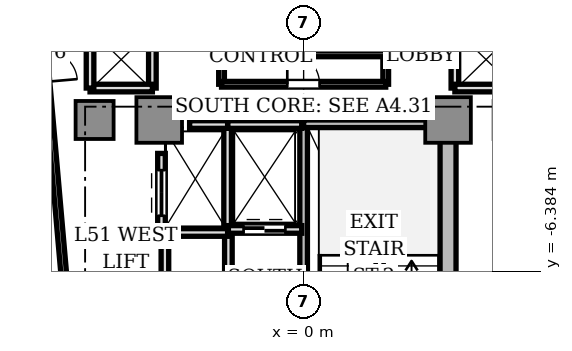
"""IFC4 building model, lengths in metres.
Left out: names, types, materials, properties, quantities, classifications, styles, units other than length and angle.
Written with IfcOpenShell. Run it as: python <this file> out.ifc"""

import sys

from ifc_helpers import new_model, si_unit, direction, frame, frame_2d, origin, origin_2d, place, context, subcontext, project, spatial, rectangle, extrude, source, transform, mapped, element, fill, save


model = new_model("IFC4")
c1 = context("Model", 3, precision=1e-05, world=origin(), true_north=direction((0.0, 1.0)))
c2 = subcontext(c1, "Body", "Model", "MODEL_VIEW")
j1 = project(units=[si_unit("LENGTHUNIT", "METRE"), si_unit("PLANEANGLEUNIT", "RADIAN")], contexts=[c1])
p1 = place(None, origin())
s1 = spatial("IfcSite", under=j1, at=p1, CompositionType="ELEMENT")
p2 = place(p1, origin())
s2 = spatial("IfcBuilding", under=s1, at=p2, CompositionType="ELEMENT")
p3 = place(p2, frame((0.0, 0.0, 185.25)))
s3 = spatial("IfcBuildingStorey", under=s2, at=p3, CompositionType="ELEMENT", Elevation=185.25)
p4 = place(p3, frame((3.8, -9.75, 0.0), z_axis=(0.0, 0.0, 1.0), x_axis=(0.0, 1.0, 0.0)))
e1 = element("IfcWall", 1, at=p4, inside=s3, PredefinedType="SHEAR", context=c2, shape_type="SweptSolid", body=[
    extrude(rectangle(XDim=6.9, YDim=0.42, at=frame_2d((3.45, 0.0))), origin(), (0.0, 0.0, 1.0), 3.11),
])
m1 = source(origin(), c2, "Body", "SweptSolid", [
    extrude(rectangle(XDim=1.2, YDim=1.2, at=origin_2d()), origin(), (0.0, 0.0, 1.0), 3.11),
])
for number, where, z_axis, x_axis in (
    (2, (-3.8, -2.4, 0.0), (0.0, 0.0, 1.0), (1.0, 0.0, 0.0)),
    (3, (3.8, -2.4, 0.0), (0.0, 0.0, 1.0), (1.0, 0.0, 0.0)),
):
    element("IfcColumn", number, at=place(p3, frame(where, z_axis=z_axis, x_axis=x_axis)), inside=s3, PredefinedType="COLUMN", context=c2, shape_type="MappedRepresentation", body=[
        mapped(m1, transform((0.0, 0.0, 0.0), scale=1.0)),
    ])
m2 = source(origin(), c2, "Body", "SweptSolid", [
    extrude(rectangle(XDim=1.0, YDim=1.0, at=origin_2d()), origin(), (0.0, 0.0, 1.0), 3.11),
])
p5 = place(p3, frame((-5.5, -2.4, 0.0), z_axis=(0.0, 0.0, 1.0), x_axis=(1.0, 0.0, 0.0)))
e4 = element("IfcColumn", 4, at=p5, inside=s3, PredefinedType="COLUMN", context=c2, shape_type="MappedRepresentation", body=[
    mapped(m2, transform((0.0, 0.0, 0.0), scale=1.0)),
])
p6 = place(p3, frame((0.0, -10.18, 0.0), z_axis=(0.0, 0.0, 1.0), x_axis=(0.0, 1.0, 0.0)))
e5 = element("IfcWall", 5, at=p6, inside=s3, PredefinedType="SOLIDWALL", context=c2, shape_type="SweptSolid", body=[
    extrude(rectangle(XDim=7.68, YDim=0.2, at=frame_2d((3.84, 0.0))), origin(), (0.0, 0.0, 1.0), 3.11),
])
p7 = place(p6, frame((0.28, 0.0, 0.0)))
e6 = element("IfcOpeningElement", 6, at=p7, cuts=e5, PredefinedType="OPENING", context=c2, shape_type="SweptSolid", body=[
    extrude(rectangle(XDim=1.1, YDim=2.15, at=frame_2d((0.55, 1.075))), frame((0.0, 0.11, 0.0), z_axis=(0.0, -1.0, 0.0), x_axis=(1.0, 0.0, 0.0)), (0.0, 0.0, 1.0), 0.22),
])
p8 = place(p3, frame((0.0, -2.5, 0.0), z_axis=(0.0, 0.0, 1.0), x_axis=(1.0, 0.0, 0.0)))
e7 = element("IfcWall", 7, at=p8, inside=s3, PredefinedType="SOLIDWALL", context=c2, shape_type="SweptSolid", body=[
    extrude(rectangle(XDim=3.72, YDim=0.2, at=frame_2d((1.86, 0.0))), origin(), (0.0, 0.0, 1.0), 3.11),
])
p9 = place(p3, frame((-1.98, -9.98, 0.0), z_axis=(0.0, 0.0, 1.0), x_axis=(0.0, 1.0, 0.0)))
e8 = element("IfcWall", 8, at=p9, inside=s3, PredefinedType="SOLIDWALL", context=c2, shape_type="SweptSolid", body=[
    extrude(rectangle(XDim=4.66, YDim=0.2, at=frame_2d((2.33, 0.0))), origin(), (0.0, 0.0, 1.0), 2.66),
])
p10 = place(p9, frame((0.2, 0.0, 0.0)))
e9 = element("IfcOpeningElement", 9, at=p10, cuts=e8, PredefinedType="OPENING", context=c2, shape_type="SweptSolid", body=[
    extrude(rectangle(XDim=0.85, YDim=2.1, at=frame_2d((0.425, 1.05))), frame((0.0, 0.11, 0.0), z_axis=(0.0, -1.0, 0.0), x_axis=(1.0, 0.0, 0.0)), (0.0, 0.0, 1.0), 0.22),
])
p11 = place(p3, frame((-2.0, -5.28, 0.0), z_axis=(0.0, 0.0, 1.0), x_axis=(0.0, 1.0, 0.0)))
e10 = element("IfcWall", 10, at=p11, inside=s3, PredefinedType="SOLIDWALL", context=c2, shape_type="SweptSolid", body=[
    extrude(rectangle(XDim=2.78, YDim=0.2, at=frame_2d((1.39, 0.0))), origin(), (0.0, 0.0, 1.0), 2.66),
])
p12 = place(p3, frame((-2.0, -2.52, 0.0), z_axis=(0.0, 0.0, 1.0), x_axis=(1.0, 0.0, 0.0)))
e11 = element("IfcWall", 11, at=p12, inside=s3, PredefinedType="SOLIDWALL", context=c2, shape_type="SweptSolid", body=[
    extrude(rectangle(XDim=1.95, YDim=0.2, at=frame_2d((0.975, 0.0))), origin(), (0.0, 0.0, 1.0), 2.66),
])
p13 = place(p3, frame((-1.98, -5.28, 0.0), z_axis=(0.0, 0.0, 1.0), x_axis=(1.0, 0.0, 0.0)))
e12 = element("IfcWall", 12, at=p13, inside=s3, PredefinedType="SOLIDWALL", context=c2, shape_type="SweptSolid", body=[
    extrude(rectangle(XDim=1.93, YDim=0.2, at=frame_2d((0.965, 0.0))), origin(), (0.0, 0.0, 1.0), 2.66),
])
p14 = place(p13, frame((0.4, 0.0, 0.0)))
e13 = element("IfcOpeningElement", 13, at=p14, cuts=e12, PredefinedType="OPENING", context=c2, shape_type="SweptSolid", body=[
    extrude(rectangle(XDim=1.1, YDim=2.2, at=frame_2d((0.55, 1.1))), frame((0.0, 0.11, 0.0), z_axis=(0.0, -1.0, 0.0), x_axis=(1.0, 0.0, 0.0)), (0.0, 0.0, 1.0), 0.22),
])
p15 = place(p3, frame((-3.0, -2.52, 0.0), z_axis=(0.0, 0.0, 1.0), x_axis=(1.0, 0.0, 0.0)))
e14 = element("IfcWall", 14, at=p15, inside=s3, PredefinedType="SOLIDWALL", context=c2, shape_type="SweptSolid", body=[
    extrude(rectangle(XDim=1.0, YDim=0.2, at=frame_2d((0.5, 0.0))), origin(), (0.0, 0.0, 1.0), 2.66),
])
p16 = place(p3, frame((-3.74, -5.36, 0.0), z_axis=(0.0, 0.0, 1.0), x_axis=(1.0, 0.0, 0.0)))
e15 = element("IfcWall", 15, at=p16, inside=s3, PredefinedType="SOLIDWALL", context=c2, shape_type="SweptSolid", body=[
    extrude(rectangle(XDim=1.74, YDim=0.2, at=frame_2d((0.87, 0.0))), origin(), (0.0, 0.0, 1.0), 2.66),
])
p17 = place(p3, frame((-3.74, -5.36, 0.0), z_axis=(0.0, 0.0, 1.0), x_axis=(0.0, 1.0, 0.0)))
e16 = element("IfcWall", 16, at=p17, inside=s3, PredefinedType="SOLIDWALL", context=c2, shape_type="SweptSolid", body=[
    extrude(rectangle(XDim=2.08, YDim=0.2, at=frame_2d((1.04, 0.0))), origin(), (0.0, 0.0, 1.0), 2.66),
])
p18 = place(p17, frame((0.44, 0.0, 0.0)))
e17 = element("IfcOpeningElement", 17, at=p18, cuts=e16, PredefinedType="OPENING", context=c2, shape_type="SweptSolid", body=[
    extrude(rectangle(XDim=1.2, YDim=2.2, at=frame_2d((0.6, 1.1))), frame((0.0, 0.11, 0.0), z_axis=(0.0, -1.0, 0.0), x_axis=(1.0, 0.0, 0.0)), (0.0, 0.0, 1.0), 0.22),
])
p19 = place(p3, frame((3.98, -1.56, 0.0), z_axis=(0.0, 0.0, 1.0), x_axis=(0.0, 1.0, 0.0)))
e18 = element("IfcWall", 18, at=p19, inside=s3, PredefinedType="SOLIDWALL", context=c2, shape_type="SweptSolid", body=[
    extrude(rectangle(XDim=3.12, YDim=0.2, at=frame_2d((1.56, 0.0))), origin(), (0.0, 0.0, 1.0), 2.28),
])
p20 = place(p3, frame((3.98, -1.56, 0.0), z_axis=(0.0, 0.0, 1.0), x_axis=(1.0, 0.0, 0.0)))
e19 = element("IfcWall", 19, at=p20, inside=s3, PredefinedType="SOLIDWALL", context=c2, shape_type="SweptSolid", body=[
    extrude(rectangle(XDim=1.64, YDim=0.2, at=frame_2d((0.82, 0.0))), origin(), (0.0, 0.0, 1.0), 2.66),
])
p21 = place(p3, frame((-3.98, -1.56, 0.0), z_axis=(0.0, 0.0, 1.0), x_axis=(0.0, 1.0, 0.0)))
e20 = element("IfcWall", 20, at=p21, inside=s3, PredefinedType="SOLIDWALL", context=c2, shape_type="SweptSolid", body=[
    extrude(rectangle(XDim=3.12, YDim=0.2, at=frame_2d((1.56, 0.0))), origin(), (0.0, 0.0, 1.0), 2.28),
])
p22 = place(p3, frame((-5.62, -1.56, 0.0), z_axis=(0.0, 0.0, 1.0), x_axis=(1.0, 0.0, 0.0)))
e21 = element("IfcWall", 21, at=p22, inside=s3, PredefinedType="SOLIDWALL", context=c2, shape_type="SweptSolid", body=[
    extrude(rectangle(XDim=1.64, YDim=0.2, at=frame_2d((0.82, 0.0))), origin(), (0.0, 0.0, 1.0), 2.66),
])
p23 = place(p3, frame((-5.62, -1.56, 0.0), z_axis=(0.0, 0.0, 1.0), x_axis=(0.0, 1.0, 0.0)))
e22 = element("IfcWall", 22, at=p23, inside=s3, PredefinedType="SOLIDWALL", context=c2, shape_type="SweptSolid", body=[
    extrude(rectangle(XDim=1.56, YDim=0.2, at=frame_2d((0.78, 0.0))), origin(), (0.0, 0.0, 1.0), 2.66),
])
p24 = place(p3, frame((-3.65, -8.81, 0.0), z_axis=(0.0, 0.0, 1.0), x_axis=(0.0, 1.0, 0.0)))
e23 = element("IfcWall", 23, at=p24, inside=s3, PredefinedType="SOLIDWALL", context=c2, shape_type="SweptSolid", body=[
    extrude(rectangle(XDim=3.43, YDim=0.2, at=frame_2d((1.715, 0.0))), origin(), (0.0, 0.0, 1.0), 2.66),
])
p25 = place(p24, frame((1.2, 0.0, 0.0)))
e24 = element("IfcOpeningElement", 24, at=p25, cuts=e23, PredefinedType="OPENING", context=c2, shape_type="SweptSolid", body=[
    extrude(rectangle(XDim=0.95, YDim=2.15, at=frame_2d((0.475, 1.075))), frame((0.0, 0.11, 0.0), z_axis=(0.0, -1.0, 0.0), x_axis=(1.0, 0.0, 0.0)), (0.0, 0.0, 1.0), 0.22),
])
p26 = place(p3, frame((2.16, -1.46, 0.0), z_axis=(0.0, 0.0, 1.0), x_axis=(0.0, 1.0, 0.0)))
e25 = element("IfcWall", 25, at=p26, inside=s3, PredefinedType="PARTITIONING", context=c2, shape_type="SweptSolid", body=[
    extrude(rectangle(XDim=2.92, YDim=0.15, at=frame_2d((1.46, 0.0))), origin(), (0.0, 0.0, 1.0), 2.66),
])
p27 = place(p26, frame((1.035, 0.0, 0.0)))
e26 = element("IfcOpeningElement", 26, at=p27, cuts=e25, PredefinedType="OPENING", context=c2, shape_type="SweptSolid", body=[
    extrude(rectangle(XDim=0.85, YDim=2.1, at=frame_2d((0.425, 1.05))), frame((0.0, 0.085, 0.0), z_axis=(0.0, -1.0, 0.0), x_axis=(1.0, 0.0, 0.0)), (0.0, 0.0, 1.0), 0.17),
])
p28 = place(p3, frame((-2.16, -1.46, 0.0), z_axis=(0.0, 0.0, 1.0), x_axis=(0.0, 1.0, 0.0)))
e27 = element("IfcWall", 27, at=p28, inside=s3, PredefinedType="PARTITIONING", context=c2, shape_type="SweptSolid", body=[
    extrude(rectangle(XDim=2.92, YDim=0.15, at=frame_2d((1.46, 0.0))), origin(), (0.0, 0.0, 1.0), 2.66),
])
p29 = place(p3, frame((-2.16, -1.46, 0.0), z_axis=(0.0, 0.0, 1.0), x_axis=(1.0, 0.0, 0.0)))
e28 = element("IfcWall", 28, at=p29, inside=s3, PredefinedType="PARTITIONING", context=c2, shape_type="SweptSolid", body=[
    extrude(rectangle(XDim=4.32, YDim=0.15, at=frame_2d((2.16, 0.0))), origin(), (0.0, 0.0, 1.0), 2.66),
])
p30 = place(p29, frame((1.73, 0.0, 0.0)))
e29 = element("IfcOpeningElement", 29, at=p30, cuts=e28, PredefinedType="OPENING", context=c2, shape_type="SweptSolid", body=[
    extrude(rectangle(XDim=0.85, YDim=2.1, at=frame_2d((0.425, 1.05))), frame((0.0, 0.085, 0.0), z_axis=(0.0, -1.0, 0.0), x_axis=(1.0, 0.0, 0.0)), (0.0, 0.0, 1.0), 0.17),
])
p31 = place(p3, frame((-2.16, -0.66, 0.0), z_axis=(0.0, 0.0, 1.0), x_axis=(1.0, 0.0, 0.0)))
e30 = element("IfcWall", 30, at=p31, inside=s3, PredefinedType="PARTITIONING", context=c2, shape_type="SweptSolid", body=[
    extrude(rectangle(XDim=4.32, YDim=0.15, at=frame_2d((2.16, 0.0))), origin(), (0.0, 0.0, 1.0), 2.66),
])
p32 = place(p3, frame((-7.373, 5.679, 0.0), z_axis=(0.0, 0.0, 1.0), x_axis=(0.087154691724, -0.996194790044, 0.0)))
e31 = element("IfcWall", 31, at=p32, inside=s3, PredefinedType="PARTITIONING", context=c2, shape_type="SweptSolid", body=[
    extrude(rectangle(XDim=12.6, YDim=0.15, at=frame_2d((6.3, 0.0))), origin(), (0.0, 0.0, 1.0), 2.66),
])
p33 = place(p32, frame((5.5, 0.0, 0.0)))
e32 = element("IfcOpeningElement", 32, at=p33, cuts=e31, PredefinedType="OPENING", context=c2, shape_type="SweptSolid", body=[
    extrude(rectangle(XDim=1.6, YDim=2.25, at=frame_2d((0.8, 1.125))), frame((0.0, 0.085, 0.0), z_axis=(0.0, -1.0, 0.0), x_axis=(1.0, 0.0, 0.0)), (0.0, 0.0, 1.0), 0.17),
])
m3 = source(origin(), c2, "Body", "SweptSolid", [
    extrude(rectangle(XDim=1.1, YDim=0.05, at=origin_2d()), origin(), (0.0, 0.0, 1.0), 2.2),
])
p34 = place(p14, frame((0.55, 0.0, 0.0)))
e33 = element("IfcDoor", 33, at=p34, inside=s3, OperationType="DOUBLE_DOOR_SLIDING", PredefinedType="DOOR", context=c2, shape_type="MappedRepresentation", body=[
    mapped(m3, transform((0.0, 0.0, 0.0), scale=1.0)),
])
fill(e13, e33)
m4 = source(origin(), c2, "Body", "SweptSolid", [
    extrude(rectangle(XDim=1.2, YDim=0.05, at=origin_2d()), origin(), (0.0, 0.0, 1.0), 2.2),
])
p35 = place(p18, frame((0.6, 0.0, 0.0)))
e34 = element("IfcDoor", 34, at=p35, inside=s3, OperationType="DOUBLE_DOOR_SLIDING", PredefinedType="DOOR", context=c2, shape_type="MappedRepresentation", body=[
    mapped(m4, transform((0.0, 0.0, 0.0), scale=1.0)),
])
fill(e17, e34)
m5 = source(origin(), c2, "Body", "SweptSolid", [
    extrude(rectangle(XDim=0.85, YDim=0.05, at=origin_2d()), origin(), (0.0, 0.0, 1.0), 2.1),
])
p36 = place(p30, frame((0.425, 0.0, 0.0)))
e35 = element("IfcDoor", 35, at=p36, inside=s3, OperationType="SINGLE_SWING_LEFT", PredefinedType="DOOR", context=c2, shape_type="MappedRepresentation", body=[
    mapped(m5, transform((0.0, 0.0, 0.0), scale=1.0)),
])
fill(e29, e35)
save(model, sys.argv[1])
